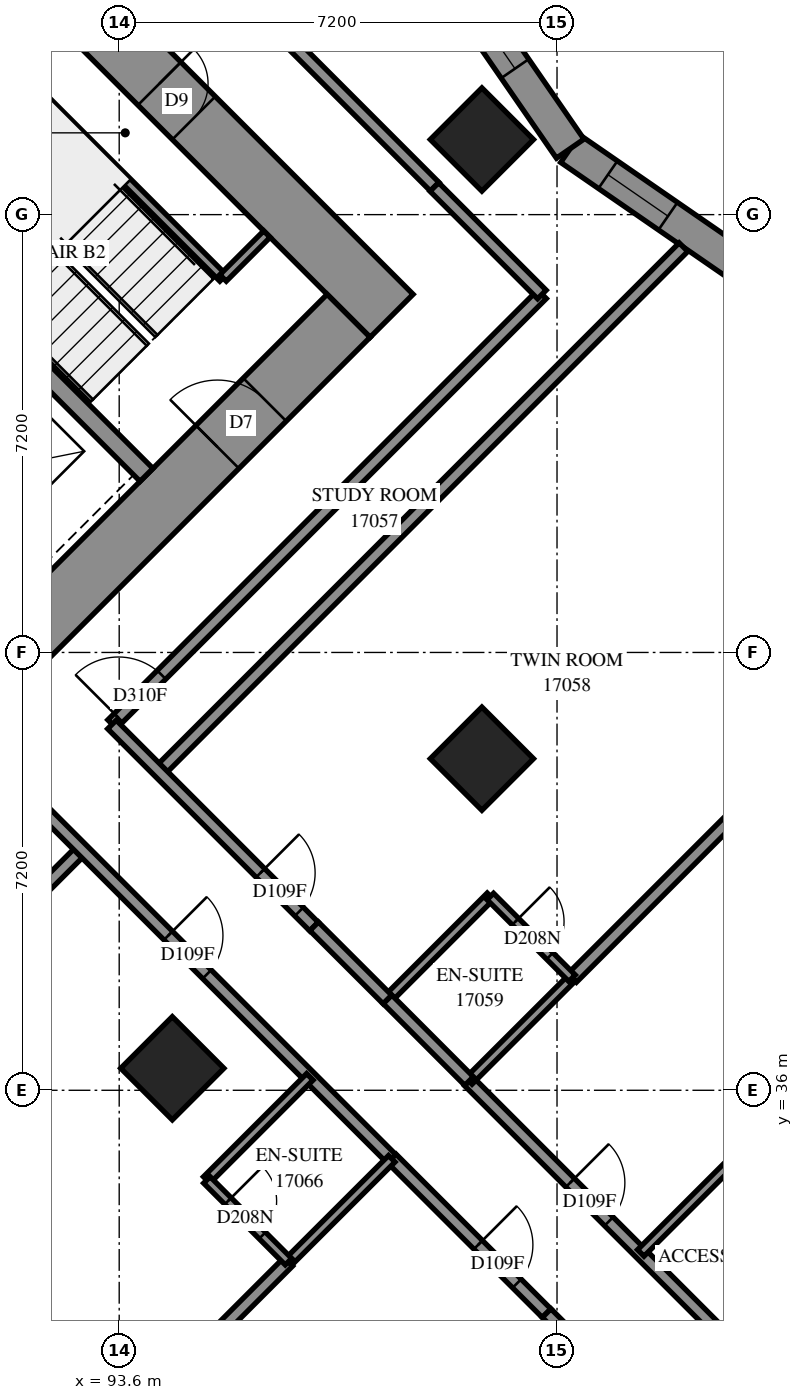
"""IFC4 building model, lengths in metres.
Left out: names, types, materials, properties, quantities, classifications, styles, units other than length and angle.
Written with IfcOpenShell. Run it as: python <this file> out.ifc"""

import sys

from ifc_helpers import new_model, si_unit, direction, frame, frame_2d, origin, origin_2d, place, context, subcontext, project, spatial, polyline, rectangle, outline, extrude, element, fill, save


model = new_model("IFC4")
c1 = context("Model", 3, precision=1e-05, world=origin(), true_north=direction((0.0, 1.0)))
c2 = subcontext(c1, "Body", "Model", "MODEL_VIEW")
j1 = project(units=[si_unit("LENGTHUNIT", "METRE"), si_unit("PLANEANGLEUNIT", "RADIAN")], contexts=[c1])
p1 = place(None, origin())
s1 = spatial("IfcSite", under=j1, at=p1, CompositionType="ELEMENT")
p2 = place(p1, origin())
s2 = spatial("IfcBuilding", under=s1, at=p2, CompositionType="ELEMENT")
p3 = place(p2, frame((0.0, 0.0, 64.4)))
s3 = spatial("IfcBuildingStorey", under=s2, at=p3, CompositionType="ELEMENT", Elevation=64.4)
for number, where, z_axis, x_axis in (
    (1, (99.565, 51.635, 0.0), (0.0, 0.0, 1.0), (0.707, -0.707, 0.0)),
    (2, (99.565, 41.453, 0.0), (0.0, 0.0, 1.0), (0.707, -0.707, 0.0)),
    (3, (94.474, 36.362, 0.0), (0.0, 0.0, 1.0), (0.707, -0.707, 0.0)),
):
    element("IfcColumn", number, at=place(p3, frame(where, z_axis=z_axis, x_axis=x_axis)), inside=s3, PredefinedType="COLUMN", context=c2, shape_type="SweptSolid", body=[
        extrude(rectangle(XDim=1.2, YDim=1.2, at=origin_2d()), origin(), (0.0, 0.0, 1.0), 3.1),
    ])
p4 = place(p3, frame((86.483, 60.333, -0.3), z_axis=(0.0, 0.0, 1.0), x_axis=(0.70710983, -0.7071037324, 0.0)))
e4 = element("IfcWall", 4, at=p4, inside=s3, PredefinedType="SHEAR", context=c2, shape_type="SweptSolid", body=[
    extrude(rectangle(XDim=16.4, YDim=1.0, at=frame_2d((8.2, 0.0))), origin(), (0.0, 0.0, 1.0), 2.7),
])
p5 = place(p4, frame((11.0, 0.0, 0.3)))
e5 = element("IfcOpeningElement", 5, at=p5, cuts=e4, PredefinedType="OPENING", context=c2, shape_type="SweptSolid", body=[
    extrude(rectangle(XDim=0.8, YDim=2.1, at=frame_2d((0.4, 1.05))), frame((0.0, 0.51, 0.0), z_axis=(0.0, -1.0, 0.0), x_axis=(1.0, 0.0, 0.0)), (0.0, 0.0, 1.0), 1.02),
])
p6 = place(p3, frame((87.19, 38.554, -0.3), z_axis=(0.0, 0.0, 1.0), x_axis=(0.707103309, 0.7071102534, 0.0)))
e6 = element("IfcWall", 6, at=p6, inside=s3, PredefinedType="SHEAR", context=c2, shape_type="SweptSolid", body=[
    extrude(rectangle(XDim=14.4, YDim=1.0, at=frame_2d((7.2, 0.0))), origin(), (0.0, 0.0, 1.0), 2.7),
])
p7 = place(p6, frame((4.55, 0.0, 0.3)))
e7 = element("IfcOpeningElement", 7, at=p7, cuts=e6, PredefinedType="OPENING", context=c2, shape_type="SweptSolid", body=[
    extrude(rectangle(XDim=1.1, YDim=2.1, at=frame_2d((0.55, 1.05))), frame((0.0, 0.51, 0.0), z_axis=(0.0, -1.0, 0.0), x_axis=(1.0, 0.0, 0.0)), (0.0, 0.0, 1.0), 1.02),
])
p8 = place(p6, frame((11.35, 0.0, 0.3)))
e8 = element("IfcOpeningElement", 8, at=p8, cuts=e6, PredefinedType="OPENING", context=c2, shape_type="SweptSolid", body=[
    extrude(rectangle(XDim=1.1, YDim=2.1, at=frame_2d((0.55, 1.05))), frame((0.0, 0.51, 0.0), z_axis=(0.0, -1.0, 0.0), x_axis=(1.0, 0.0, 0.0)), (0.0, 0.0, 1.0), 1.02),
])
p9 = place(p3, frame((88.958, 51.211, 0.0), z_axis=(0.0, 0.0, 1.0), x_axis=(0.7070998367, -0.7071137256, 0.0)))
e9 = element("IfcWall", 9, at=p9, inside=s3, PredefinedType="SOLIDWALL", context=c2, shape_type="SweptSolid", body=[
    extrude(rectangle(XDim=7.2, YDim=0.3, at=frame_2d((3.6, 0.0))), origin(), (0.0, 0.0, 1.0), 3.1),
])
p10 = place(p3, frame((103.893, 49.499, 0.0), z_axis=(0.0, 0.0, 1.0), x_axis=(-0.8229761943, 0.5680758609, 0.0)))
e10 = element("IfcWall", 10, at=p10, inside=s3, PredefinedType="SOLIDWALL", context=c2, shape_type="SweptSolid", body=[
    extrude(outline(polyline([(-0.05, -0.275), (3.445, -0.275), (3.546, 0.275), (0.05, 0.275), (-0.05, -0.275)])), origin(), (0.0, 0.0, 1.0), 3.1),
])
p11 = place(p10, frame((1.541, 0.0, 0.5)))
e11 = element("IfcOpeningElement", 11, at=p11, cuts=e10, PredefinedType="OPENING", context=c2, shape_type="SweptSolid", body=[
    extrude(rectangle(XDim=1.2, YDim=2.45, at=frame_2d((0.6, 1.225))), frame((0.0, 0.285, 0.0), z_axis=(0.0, -1.0, 0.0), x_axis=(1.0, 0.0, 0.0)), (0.0, 0.0, 1.0), 0.57),
])
p12 = place(p3, frame((101.016, 51.485, 0.0), z_axis=(0.0, 0.0, 1.0), x_axis=(-0.5680892359, 0.8229669617, 0.0)))
e12 = element("IfcWall", 12, at=p12, inside=s3, PredefinedType="SOLIDWALL", context=c2, shape_type="SweptSolid", body=[
    extrude(outline(polyline([(0.05, -0.275), (3.546, -0.275), (3.445, 0.275), (-0.05, 0.275), (0.05, -0.275)])), origin(), (0.0, 0.0, 1.0), 3.1),
])
p13 = place(p12, frame((1.598, 0.0, 0.5)))
e13 = element("IfcOpeningElement", 13, at=p13, cuts=e12, PredefinedType="OPENING", context=c2, shape_type="SweptSolid", body=[
    extrude(rectangle(XDim=1.2, YDim=2.45, at=frame_2d((0.6, 1.225))), frame((0.0, 0.285, 0.0), z_axis=(0.0, -1.0, 0.0), x_axis=(1.0, 0.0, 0.0)), (0.0, 0.0, 1.0), 0.57),
])
p14 = place(p3, frame((91.313, 53.354, 0.0), z_axis=(0.0, 0.0, 1.0), x_axis=(0.7071067812, -0.7071067812, 0.0)))
e14 = element("IfcWall", 14, at=p14, inside=s3, PredefinedType="PARTITIONING", context=c2, shape_type="SweptSolid", body=[
    extrude(rectangle(XDim=5.65, YDim=0.15, at=frame_2d((2.825, 0.0))), origin(), (0.0, 0.0, 1.0), 3.1),
])
p15 = place(p3, frame((95.308, 49.358, 0.0), z_axis=(0.0, 0.0, 1.0), x_axis=(0.70705776, 0.707155799, 0.0)))
e15 = element("IfcWall", 15, at=p15, inside=s3, PredefinedType="PARTITIONING", context=c2, shape_type="SweptSolid", body=[
    extrude(rectangle(XDim=1.02, YDim=0.15, at=frame_2d((0.51, 0.0))), origin(), (0.0, 0.0, 1.0), 3.1),
])
p16 = place(p3, frame((94.259, 41.243, 0.0), z_axis=(0.0, 0.0, 1.0), x_axis=(0.7070206559, 0.7071928959, 0.0)))
e16 = element("IfcWall", 16, at=p16, inside=s3, PredefinedType="PARTITIONING", context=c2, shape_type="SweptSolid", body=[
    extrude(rectangle(XDim=12.192, YDim=0.2, at=frame_2d((6.096, 0.0))), origin(), (0.0, 0.0, 1.0), 3.1),
])
p17 = place(p3, frame((93.484, 42.02, 0.0), z_axis=(0.0, 0.0, 1.0), x_axis=(0.7071067812, 0.7071067812, 0.0)))
e17 = element("IfcWall", 17, at=p17, inside=s3, PredefinedType="PARTITIONING", context=c2, shape_type="SweptSolid", body=[
    extrude(rectangle(XDim=9.998, YDim=0.2, at=frame_2d((4.999, 0.0))), origin(), (0.0, 0.0, 1.0), 3.1),
])
p18 = place(p17, frame((0.148, 0.0, 0.0)))
e18 = element("IfcOpeningElement", 18, at=p18, cuts=e17, PredefinedType="OPENING", context=c2, shape_type="SweptSolid", body=[
    extrude(rectangle(XDim=1.0, YDim=2.1, at=frame_2d((0.5, 1.05))), frame((0.0, 0.11, 0.0), z_axis=(0.0, -1.0, 0.0), x_axis=(1.0, 0.0, 0.0)), (0.0, 0.0, 1.0), 0.22),
])
p19 = place(p3, frame((101.049, 37.847, 0.0), z_axis=(0.0, 0.0, 1.0), x_axis=(0.7071067812, 0.7071067812, 0.0)))
e19 = element("IfcWall", 19, at=p19, inside=s3, PredefinedType="PARTITIONING", context=c2, shape_type="SweptSolid", body=[
    extrude(rectangle(XDim=9.852, YDim=0.2, at=frame_2d((4.926, 0.0))), origin(), (0.0, 0.0, 1.0), 3.1),
])
p20 = place(p3, frame((86.309, 33.281, 0.0), z_axis=(0.0, 0.0, 1.0), x_axis=(0.7069956745, 0.7072178704, 0.0)))
e20 = element("IfcWall", 20, at=p20, inside=s3, PredefinedType="PARTITIONING", context=c2, shape_type="SweptSolid", body=[
    extrude(rectangle(XDim=9.451, YDim=0.2, at=frame_2d((4.726, 0.0))), origin(), (0.0, 0.0, 1.0), 3.1),
])
p21 = place(p3, frame((92.349, 40.601, 0.0), z_axis=(0.0, 0.0, 1.0), x_axis=(0.7071067812, -0.7071067812, 0.0)))
e21 = element("IfcWall", 21, at=p21, inside=s3, PredefinedType="PARTITIONING", context=c2, shape_type="SweptSolid", body=[
    extrude(rectangle(XDim=8.101, YDim=0.2, at=frame_2d((4.05, 0.0))), origin(), (0.0, 0.0, 1.0), 3.1),
])
p22 = place(p21, frame((2.909, 0.0, 0.0)))
e22 = element("IfcOpeningElement", 22, at=p22, cuts=e21, PredefinedType="OPENING", context=c2, shape_type="SweptSolid", body=[
    extrude(rectangle(XDim=0.9, YDim=2.1, at=frame_2d((0.45, 1.05))), frame((0.0, 0.11, 0.0), z_axis=(0.0, -1.0, 0.0), x_axis=(1.0, 0.0, 0.0)), (0.0, 0.0, 1.0), 0.22),
])
p23 = place(p3, frame((99.349, 36.147, 0.0), z_axis=(0.0, 0.0, 1.0), x_axis=(0.7071067812, -0.7071067812, 0.0)))
e23 = element("IfcWall", 23, at=p23, inside=s3, PredefinedType="PARTITIONING", context=c2, shape_type="SweptSolid", body=[
    extrude(rectangle(XDim=7.201, YDim=0.2, at=frame_2d((3.601, 0.0))), origin(), (0.0, 0.0, 1.0), 3.1),
])
p24 = place(p23, frame((2.358, 0.0, 0.0)))
e24 = element("IfcOpeningElement", 24, at=p24, cuts=e23, PredefinedType="OPENING", context=c2, shape_type="SweptSolid", body=[
    extrude(rectangle(XDim=0.9, YDim=2.1, at=frame_2d((0.45, 1.05))), frame((0.0, 0.11, 0.0), z_axis=(0.0, -1.0, 0.0), x_axis=(1.0, 0.0, 0.0)), (0.0, 0.0, 1.0), 0.22),
])
p25 = place(p3, frame((91.458, 28.256, 0.0), z_axis=(0.0, 0.0, 1.0), x_axis=(0.7071067812, 0.7071067812, 0.0)))
e25 = element("IfcWall", 25, at=p25, inside=s3, PredefinedType="PARTITIONING", context=c2, shape_type="SweptSolid", body=[
    extrude(rectangle(XDim=6.963, YDim=0.2, at=frame_2d((3.482, 0.0))), origin(), (0.0, 0.0, 1.0), 3.1),
])
p26 = place(p3, frame((93.481, 42.015, 0.0), z_axis=(0.0, 0.0, 1.0), x_axis=(0.7071067812, -0.7071067812, 0.0)))
e26 = element("IfcWall", 26, at=p26, inside=s3, PredefinedType="PARTITIONING", context=c2, shape_type="SweptSolid", body=[
    extrude(rectangle(XDim=4.698, YDim=0.2, at=frame_2d((2.349, 0.0))), origin(), (0.0, 0.0, 1.0), 3.1),
])
p27 = place(p26, frame((3.452, 0.0, 0.0)))
e27 = element("IfcOpeningElement", 27, at=p27, cuts=e26, PredefinedType="OPENING", context=c2, shape_type="SweptSolid", body=[
    extrude(rectangle(XDim=0.9, YDim=2.1, at=frame_2d((0.45, 1.05))), frame((0.0, 0.11, 0.0), z_axis=(0.0, -1.0, 0.0), x_axis=(1.0, 0.0, 0.0)), (0.0, 0.0, 1.0), 0.22),
])
p28 = place(p3, frame((96.244, 53.406, 0.0), z_axis=(0.0, 0.0, 1.0), x_axis=(0.7068288851, -0.7073845681, 0.0)))
e28 = element("IfcWall", 28, at=p28, inside=s3, PredefinedType="PARTITIONING", context=c2, shape_type="SweptSolid", body=[
    extrude(rectangle(XDim=3.599, YDim=0.2, at=frame_2d((1.8, 0.0))), origin(), (0.0, 0.0, 1.0), 3.1),
])
p29 = place(p3, frame((98.082, 34.879, 0.0), z_axis=(0.0, 0.0, 1.0), x_axis=(0.7073845681, -0.7068288851, 0.0)))
e29 = element("IfcWall", 29, at=p29, inside=s3, PredefinedType="PARTITIONING", context=c2, shape_type="SweptSolid", body=[
    extrude(rectangle(XDim=3.599, YDim=0.2, at=frame_2d((1.8, 0.0))), origin(), (0.0, 0.0, 1.0), 3.1),
])
p30 = place(p29, frame((2.009, 0.0, 0.0)))
e30 = element("IfcOpeningElement", 30, at=p30, cuts=e29, PredefinedType="OPENING", context=c2, shape_type="SweptSolid", body=[
    extrude(rectangle(XDim=0.9, YDim=2.1, at=frame_2d((0.45, 1.05))), frame((0.0, 0.11, 0.0), z_axis=(0.0, -1.0, 0.0), x_axis=(1.0, 0.0, 0.0)), (0.0, 0.0, 1.0), 0.22),
])
p31 = place(p3, frame((98.783, 50.855, 0.0), z_axis=(0.0, 0.0, 1.0), x_axis=(0.7071067812, -0.7071067812, 0.0)))
e31 = element("IfcWall", 31, at=p31, inside=s3, PredefinedType="PARTITIONING", context=c2, shape_type="SweptSolid", body=[
    extrude(rectangle(XDim=2.5, YDim=0.2, at=frame_2d((1.25, 0.0))), origin(), (0.0, 0.0, 1.0), 3.1),
])
for number, where, z_axis, x_axis in (
    (32, (96.384, 33.178, 0.0), (0.0, 0.0, 1.0), (0.708, 0.707, 0.0)),
    (33, (99.349, 36.153, 0.0), (0.0, 0.0, 1.0), (0.708, 0.707, 0.0)),
    (34, (102.177, 33.325, 0.0), (0.0, 0.0, 1.0), (0.708, 0.707, 0.0)),
):
    element("IfcWall", number, at=place(p3, frame(where, z_axis=z_axis, x_axis=x_axis)), inside=s3, PredefinedType="PARTITIONING", context=c2, shape_type="SweptSolid", body=[
        extrude(rectangle(XDim=2.4, YDim=0.15, at=frame_2d((1.2, 0.0))), origin(), (0.0, 0.0, 1.0), 3.1),
    ])
for number, where, z_axis, x_axis in (
    (35, (95.039, 34.525, 0.0), (0.0, 0.0, 1.0), (0.707, 0.707, 0.0)),
    (36, (98.009, 37.495, 0.0), (0.0, 0.0, 1.0), (0.707, 0.707, 0.0)),
):
    element("IfcWall", number, at=place(p3, frame(where, z_axis=z_axis, x_axis=x_axis)), inside=s3, PredefinedType="PARTITIONING", context=c2, shape_type="SweptSolid", body=[
        extrude(rectangle(XDim=2.398, YDim=0.15, at=frame_2d((1.199, 0.0))), origin(), (0.0, 0.0, 1.0), 3.1),
    ])
p32 = place(p3, frame((99.703, 39.187, 0.0), z_axis=(0.0, 0.0, 1.0), x_axis=(0.7071067812, -0.7071067812, 0.0)))
e37 = element("IfcWall", 37, at=p32, inside=s3, PredefinedType="PARTITIONING", context=c2, shape_type="SweptSolid", body=[
    extrude(rectangle(XDim=1.901, YDim=0.15, at=frame_2d((0.95, 0.0))), origin(), (0.0, 0.0, 1.0), 3.1),
])
p33 = place(p32, frame((0.584, 0.0, 0.0)))
e38 = element("IfcOpeningElement", 38, at=p33, cuts=e37, PredefinedType="OPENING", context=c2, shape_type="SweptSolid", body=[
    extrude(rectangle(XDim=0.8, YDim=2.1, at=frame_2d((0.4, 1.05))), frame((0.0, 0.085, 0.0), z_axis=(0.0, -1.0, 0.0), x_axis=(1.0, 0.0, 0.0)), (0.0, 0.0, 1.0), 0.17),
])
p34 = place(p3, frame((98.012, 37.496, 0.0), z_axis=(0.0, 0.0, 1.0), x_axis=(0.7065800724, -0.7076330979, 0.0)))
e39 = element("IfcWall", 39, at=p34, inside=s3, PredefinedType="PARTITIONING", context=c2, shape_type="SweptSolid", body=[
    extrude(rectangle(XDim=1.899, YDim=0.2, at=frame_2d((0.95, 0.0))), origin(), (0.0, 0.0, 1.0), 3.1),
])
p35 = place(p3, frame((95.042, 34.526, 0.0), z_axis=(0.0, 0.0, 1.0), x_axis=(0.7065800724, -0.7076330979, 0.0)))
e40 = element("IfcWall", 40, at=p35, inside=s3, PredefinedType="PARTITIONING", context=c2, shape_type="SweptSolid", body=[
    extrude(rectangle(XDim=1.899, YDim=0.15, at=frame_2d((0.95, 0.0))), origin(), (0.0, 0.0, 1.0), 3.1),
])
p36 = place(p35, frame((0.491, 0.0, 0.0)))
e41 = element("IfcOpeningElement", 41, at=p36, cuts=e40, PredefinedType="OPENING", context=c2, shape_type="SweptSolid", body=[
    extrude(rectangle(XDim=0.8, YDim=2.1, at=frame_2d((0.4, 1.05))), frame((0.0, 0.085, 0.0), z_axis=(0.0, -1.0, 0.0), x_axis=(1.0, 0.0, 0.0)), (0.0, 0.0, 1.0), 0.17),
])
p37 = place(p3, frame((96.806, 38.696, 0.0), z_axis=(0.0, 0.0, 1.0), x_axis=(0.7076943229, -0.7065187509, 0.0)))
e42 = element("IfcWall", 42, at=p37, inside=s3, PredefinedType="PARTITIONING", context=c2, shape_type="SweptSolid", body=[
    extrude(rectangle(XDim=1.701, YDim=0.2, at=frame_2d((0.851, 0.0))), origin(), (0.0, 0.0, 1.0), 3.1),
])
p38 = place(p3, frame((100.629, 32.335, 0.0), z_axis=(0.0, 0.0, 1.0), x_axis=(0.7071067812, -0.7071067812, 0.0)))
e43 = element("IfcWall", 43, at=p38, inside=s3, PredefinedType="PARTITIONING", context=c2, shape_type="SweptSolid", body=[
    extrude(rectangle(XDim=1.7, YDim=0.2, at=frame_2d((0.85, 0.0))), origin(), (0.0, 0.0, 1.0), 3.1),
])
p39 = place(p11, origin())
e44 = element("IfcWindow", 44, at=p39, inside=s3, PartitioningType="SINGLE_PANEL", PredefinedType="WINDOW", context=c2, shape_type="SweptSolid", body=[
    extrude(rectangle(XDim=1.2, YDim=2.45, at=frame_2d((0.6, 1.225))), frame((0.0, 0.155, 0.0), z_axis=(0.0, -1.0, 0.0), x_axis=(1.0, 0.0, 0.0)), (0.0, 0.0, 1.0), 0.06),
])
fill(e11, e44)
p40 = place(p13, origin())
e45 = element("IfcWindow", 45, at=p40, inside=s3, PartitioningType="SINGLE_PANEL", PredefinedType="WINDOW", context=c2, shape_type="SweptSolid", body=[
    extrude(rectangle(XDim=1.2, YDim=2.45, at=frame_2d((0.6, 1.225))), frame((0.0, 0.155, 0.0), z_axis=(0.0, -1.0, 0.0), x_axis=(1.0, 0.0, 0.0)), (0.0, 0.0, 1.0), 0.06),
])
fill(e13, e45)
p41 = place(p5, origin())
e46 = element("IfcDoor", 46, at=p41, inside=s3, OperationType="SINGLE_SWING_RIGHT", PredefinedType="DOOR", context=c2, shape_type="SweptSolid", body=[
    extrude(rectangle(XDim=0.8, YDim=2.1, at=frame_2d((0.4, 1.05))), frame((0.0, -0.44, 0.0), z_axis=(0.0, -1.0, 0.0), x_axis=(1.0, 0.0, 0.0)), (0.0, 0.0, 1.0), 0.05),
])
fill(e5, e46)
p42 = place(p8, origin())
e47 = element("IfcDoor", 47, at=p42, inside=s3, OperationType="SINGLE_SWING_RIGHT", PredefinedType="DOOR", context=c2, shape_type="SweptSolid", body=[
    extrude(rectangle(XDim=1.1, YDim=2.1, at=frame_2d((0.55, 1.05))), frame((0.0, 0.025, 0.0), z_axis=(0.0, -1.0, 0.0), x_axis=(1.0, 0.0, 0.0)), (0.0, 0.0, 1.0), 0.05),
])
fill(e8, e47)
p43 = place(p18, origin())
e48 = element("IfcDoor", 48, at=p43, inside=s3, OperationType="SINGLE_SWING_LEFT", PredefinedType="DOOR", context=c2, shape_type="SweptSolid", body=[
    extrude(rectangle(XDim=1.0, YDim=2.1, at=frame_2d((0.5, 1.05))), frame((0.0, 0.025, 0.0), z_axis=(0.0, -1.0, 0.0), x_axis=(1.0, 0.0, 0.0)), (0.0, 0.0, 1.0), 0.05),
])
fill(e18, e48)
p44 = place(p27, origin())
e49 = element("IfcDoor", 49, at=p44, inside=s3, OperationType="SINGLE_SWING_RIGHT", PredefinedType="DOOR", context=c2, shape_type="SweptSolid", body=[
    extrude(rectangle(XDim=0.9, YDim=2.1, at=frame_2d((0.45, 1.05))), frame((0.0, 0.025, 0.0), z_axis=(0.0, -1.0, 0.0), x_axis=(1.0, 0.0, 0.0)), (0.0, 0.0, 1.0), 0.05),
])
fill(e27, e49)
p45 = place(p33, origin())
e50 = element("IfcDoor", 50, at=p45, inside=s3, OperationType="SINGLE_SWING_RIGHT", PredefinedType="DOOR", context=c2, shape_type="SweptSolid", body=[
    extrude(rectangle(XDim=0.8, YDim=2.1, at=frame_2d((0.4, 1.05))), frame((0.0, 0.025, 0.0), z_axis=(0.0, -1.0, 0.0), x_axis=(1.0, 0.0, 0.0)), (0.0, 0.0, 1.0), 0.05),
])
fill(e38, e50)
p46 = place(p24, origin())
e51 = element("IfcDoor", 51, at=p46, inside=s3, OperationType="SINGLE_SWING_RIGHT", PredefinedType="DOOR", context=c2, shape_type="SweptSolid", body=[
    extrude(rectangle(XDim=0.9, YDim=2.1, at=frame_2d((0.45, 1.05))), frame((0.0, 0.025, 0.0), z_axis=(0.0, -1.0, 0.0), x_axis=(1.0, 0.0, 0.0)), (0.0, 0.0, 1.0), 0.05),
])
fill(e24, e51)
p47 = place(p22, origin())
e52 = element("IfcDoor", 52, at=p47, inside=s3, OperationType="SINGLE_SWING_LEFT", PredefinedType="DOOR", context=c2, shape_type="SweptSolid", body=[
    extrude(rectangle(XDim=0.9, YDim=2.1, at=frame_2d((0.45, 1.05))), frame((0.0, 0.025, 0.0), z_axis=(0.0, -1.0, 0.0), x_axis=(1.0, 0.0, 0.0)), (0.0, 0.0, 1.0), 0.05),
])
fill(e22, e52)
p48 = place(p36, origin())
e53 = element("IfcDoor", 53, at=p48, inside=s3, OperationType="SINGLE_SWING_RIGHT", PredefinedType="DOOR", context=c2, shape_type="SweptSolid", body=[
    extrude(rectangle(XDim=0.8, YDim=2.1, at=frame_2d((0.4, 1.05))), frame((0.0, 0.025, 0.0), z_axis=(0.0, -1.0, 0.0), x_axis=(1.0, 0.0, 0.0)), (0.0, 0.0, 1.0), 0.05),
])
fill(e41, e53)
p49 = place(p30, origin())
e54 = element("IfcDoor", 54, at=p49, inside=s3, OperationType="SINGLE_SWING_LEFT", PredefinedType="DOOR", context=c2, shape_type="SweptSolid", body=[
    extrude(rectangle(XDim=0.9, YDim=2.1, at=frame_2d((0.45, 1.05))), frame((0.0, 0.025, 0.0), z_axis=(0.0, -1.0, 0.0), x_axis=(1.0, 0.0, 0.0)), (0.0, 0.0, 1.0), 0.05),
])
fill(e30, e54)
save(model, sys.argv[1])
